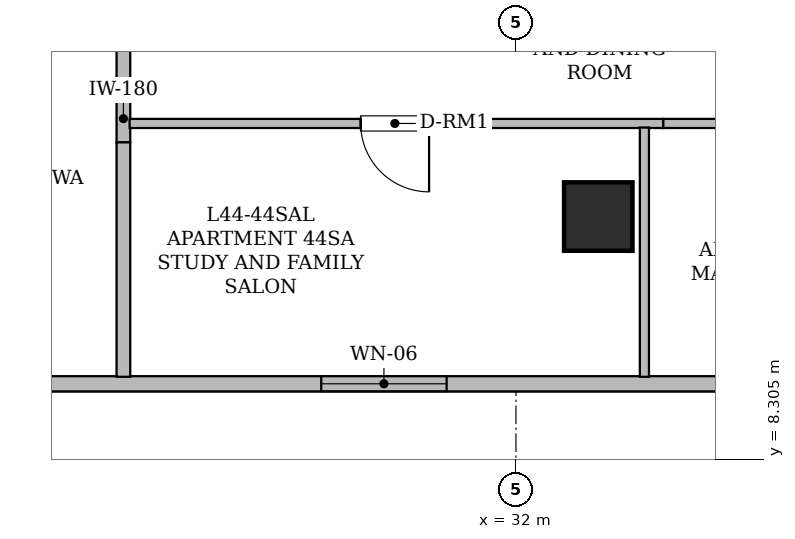
"""IFC4 building model, lengths in metres.
Left out: names, types, materials, properties, quantities, classifications, styles, units other than length and angle.
Written with IfcOpenShell. Run it as: python <this file> out.ifc"""

import sys

from ifc_helpers import new_model, si_unit, direction, frame, frame_2d, origin, origin_2d, place, context, subcontext, project, spatial, rectangle, hollow_rectangle, extrude, element, fill, save


model = new_model("IFC4")
c1 = context("Model", 3, precision=1e-05, world=origin(), true_north=direction((0.0, 1.0)))
c2 = subcontext(c1, "Body", "Model", "MODEL_VIEW")
j1 = project(units=[si_unit("LENGTHUNIT", "METRE"), si_unit("PLANEANGLEUNIT", "RADIAN")], contexts=[c1])
p1 = place(None, origin())
s1 = spatial("IfcSite", under=j1, at=p1, CompositionType="ELEMENT")
p2 = place(p1, origin())
s2 = spatial("IfcBuilding", under=s1, at=p2, CompositionType="ELEMENT")
p3 = place(p2, frame((0.0, 0.0, 174.15)))
s3 = spatial("IfcBuildingStorey", under=s2, at=p3, CompositionType="ELEMENT", Elevation=174.15)
p4 = place(p3, frame((33.083, 11.5, 0.0), z_axis=(0.0, 0.0, 1.0), x_axis=(1.0, 0.0, 0.0)))
e1 = element("IfcColumn", 1, at=p4, inside=s3, PredefinedType="COLUMN", context=c2, shape_type="SweptSolid", body=[
    extrude(hollow_rectangle(XDim=0.9, YDim=0.9, WallThickness=0.045, at=origin_2d()), origin(), (0.0, 0.0, 1.0), 3.65),
])
p5 = place(p3, frame((58.896, 9.3, 0.0), z_axis=(0.0, 0.0, 1.0), x_axis=(-1.0, 0.0, 0.0)))
e2 = element("IfcWall", 2, at=p5, inside=s3, PredefinedType="STANDARD", context=c2, shape_type="SweptSolid", body=[
    extrude(rectangle(XDim=39.793, YDim=0.2, at=frame_2d((19.896, 0.0))), origin(), (0.0, 0.0, 1.0), 3.43),
])
p6 = place(p5, frame((33.841, 0.0, 0.85)))
e3 = element("IfcOpeningElement", 3, at=p6, cuts=e2, PredefinedType="OPENING", context=c2, shape_type="SweptSolid", body=[
    extrude(rectangle(XDim=1.65, YDim=1.55, at=frame_2d((0.825, 0.775))), frame((0.0, 0.11, 0.0), z_axis=(0.0, -1.0, 0.0), x_axis=(1.0, 0.0, 0.0)), (0.0, 0.0, 1.0), 0.22),
])
p7 = place(p5, frame((27.808, 0.0, 0.85)))
e4 = element("IfcOpeningElement", 4, at=p7, cuts=e2, PredefinedType="OPENING", context=c2, shape_type="SweptSolid", body=[
    extrude(rectangle(XDim=1.65, YDim=1.55, at=frame_2d((0.825, 0.775))), frame((0.0, 0.11, 0.0), z_axis=(0.0, -1.0, 0.0), x_axis=(1.0, 0.0, 0.0)), (0.0, 0.0, 1.0), 0.22),
])
p8 = place(p5, frame((20.418, 0.0, 0.85)))
e5 = element("IfcOpeningElement", 5, at=p8, cuts=e2, PredefinedType="OPENING", context=c2, shape_type="SweptSolid", body=[
    extrude(rectangle(XDim=1.65, YDim=1.55, at=frame_2d((0.825, 0.775))), frame((0.0, 0.11, 0.0), z_axis=(0.0, -1.0, 0.0), x_axis=(1.0, 0.0, 0.0)), (0.0, 0.0, 1.0), 0.22),
])
p9 = place(p5, frame((14.869, 0.0, 0.85)))
e6 = element("IfcOpeningElement", 6, at=p9, cuts=e2, PredefinedType="OPENING", context=c2, shape_type="SweptSolid", body=[
    extrude(rectangle(XDim=1.65, YDim=1.55, at=frame_2d((0.825, 0.775))), frame((0.0, 0.11, 0.0), z_axis=(0.0, -1.0, 0.0), x_axis=(1.0, 0.0, 0.0)), (0.0, 0.0, 1.0), 0.22),
])
p10 = place(p5, frame((12.718, 0.0, 0.8)))
e7 = element("IfcOpeningElement", 7, at=p10, cuts=e2, PredefinedType="OPENING", context=c2, shape_type="SweptSolid", body=[
    extrude(rectangle(XDim=1.2, YDim=1.5, at=frame_2d((0.6, 0.75))), frame((0.0, 0.11, 0.0), z_axis=(0.0, -1.0, 0.0), x_axis=(1.0, 0.0, 0.0)), (0.0, 0.0, 1.0), 0.22),
])
p11 = place(p5, frame((8.394, 0.0, 0.85)))
e8 = element("IfcOpeningElement", 8, at=p11, cuts=e2, PredefinedType="OPENING", context=c2, shape_type="SweptSolid", body=[
    extrude(rectangle(XDim=1.65, YDim=1.55, at=frame_2d((0.825, 0.775))), frame((0.0, 0.11, 0.0), z_axis=(0.0, -1.0, 0.0), x_axis=(1.0, 0.0, 0.0)), (0.0, 0.0, 1.0), 0.22),
])
p12 = place(p5, frame((2.936, 0.0, 0.85)))
e9 = element("IfcOpeningElement", 9, at=p12, cuts=e2, PredefinedType="OPENING", context=c2, shape_type="SweptSolid", body=[
    extrude(rectangle(XDim=1.65, YDim=1.55, at=frame_2d((0.825, 0.775))), frame((0.0, 0.11, 0.0), z_axis=(0.0, -1.0, 0.0), x_axis=(1.0, 0.0, 0.0)), (0.0, 0.0, 1.0), 0.22),
])
p13 = place(p3, frame((26.835, 14.554, 0.0), z_axis=(0.0, 0.0, 1.0), x_axis=(0.0, -1.0, 0.0)))
e10 = element("IfcWall", 10, at=p13, inside=s3, PredefinedType="STANDARD", context=c2, shape_type="SweptSolid", body=[
    extrude(rectangle(XDim=2.078, YDim=0.18, at=frame_2d((1.039, 0.0))), origin(), (0.0, 0.0, 1.0), 2.961),
])
p14 = place(p3, frame((26.835, 12.476, 0.0), z_axis=(0.0, 0.0, 1.0), x_axis=(0.0, -1.0, 0.0)))
e11 = element("IfcWall", 11, at=p14, inside=s3, PredefinedType="STANDARD", context=c2, shape_type="SweptSolid", body=[
    extrude(rectangle(XDim=3.084, YDim=0.18, at=frame_2d((1.542, 0.0))), origin(), (0.0, 0.0, 1.0), 2.876),
])
p15 = place(p3, frame((33.939, 12.725, 0.0), z_axis=(0.0, 0.0, 1.0), x_axis=(-1.0, 0.0, 0.0)))
e12 = element("IfcWall", 12, at=p15, inside=s3, PredefinedType="PARTITIONING", context=c2, shape_type="SweptSolid", body=[
    extrude(rectangle(XDim=7.022, YDim=0.12, at=frame_2d((3.511, 0.0))), origin(), (0.0, 0.0, 1.0), 2.725),
])
p16 = place(p15, frame((3.082, 0.0, 0.0)))
e13 = element("IfcOpeningElement", 13, at=p16, cuts=e12, PredefinedType="OPENING", context=c2, shape_type="SweptSolid", body=[
    extrude(rectangle(XDim=0.9, YDim=2.1, at=frame_2d((0.45, 1.05))), frame((0.0, 0.07, 0.0), z_axis=(0.0, -1.0, 0.0), x_axis=(1.0, 0.0, 0.0)), (0.0, 0.0, 1.0), 0.14),
])
p17 = place(p3, frame((41.55, 12.725, 0.0), z_axis=(0.0, 0.0, 1.0), x_axis=(-1.0, 0.0, 0.0)))
e14 = element("IfcWall", 14, at=p17, inside=s3, PredefinedType="PARTITIONING", context=c2, shape_type="SweptSolid", body=[
    extrude(rectangle(XDim=7.611, YDim=0.12, at=frame_2d((3.806, 0.0))), origin(), (0.0, 0.0, 1.0), 3.43),
])
p18 = place(p17, frame((3.355, 0.0, 0.0)))
e15 = element("IfcOpeningElement", 15, at=p18, cuts=e14, PredefinedType="OPENING", context=c2, shape_type="SweptSolid", body=[
    extrude(rectangle(XDim=0.9, YDim=2.1, at=frame_2d((0.45, 1.05))), frame((0.0, 0.07, 0.0), z_axis=(0.0, -1.0, 0.0), x_axis=(1.0, 0.0, 0.0)), (0.0, 0.0, 1.0), 0.14),
])
p19 = place(p3, frame((33.69, 12.671, 0.0), z_axis=(0.0, 0.0, 1.0), x_axis=(0.0, -1.0, 0.0)))
e16 = element("IfcWall", 16, at=p19, inside=s3, PredefinedType="PARTITIONING", context=c2, shape_type="SweptSolid", body=[
    extrude(rectangle(XDim=3.279, YDim=0.12, at=frame_2d((1.639, 0.0))), origin(), (0.0, 0.0, 1.0), 2.876),
])
p20 = place(p7, origin())
e17 = element("IfcWindow", 17, at=p20, inside=s3, PartitioningType="SINGLE_PANEL", PredefinedType="WINDOW", context=c2, shape_type="SweptSolid", body=[
    extrude(rectangle(XDim=1.65, YDim=1.55, at=frame_2d((0.825, 0.775))), frame((0.0, 0.03, 0.0), z_axis=(0.0, -1.0, 0.0), x_axis=(1.0, 0.0, 0.0)), (0.0, 0.0, 1.0), 0.06),
])
fill(e4, e17)
p21 = place(p16, origin())
e18 = element("IfcDoor", 18, at=p21, inside=s3, OperationType="SINGLE_SWING_LEFT", PredefinedType="DOOR", context=c2, shape_type="SweptSolid", body=[
    extrude(rectangle(XDim=0.9, YDim=2.1, at=frame_2d((0.45, 1.05))), frame((0.0, 0.025, 0.0), z_axis=(0.0, -1.0, 0.0), x_axis=(1.0, 0.0, 0.0)), (0.0, 0.0, 1.0), 0.05),
])
fill(e13, e18)
save(model, sys.argv[1])
